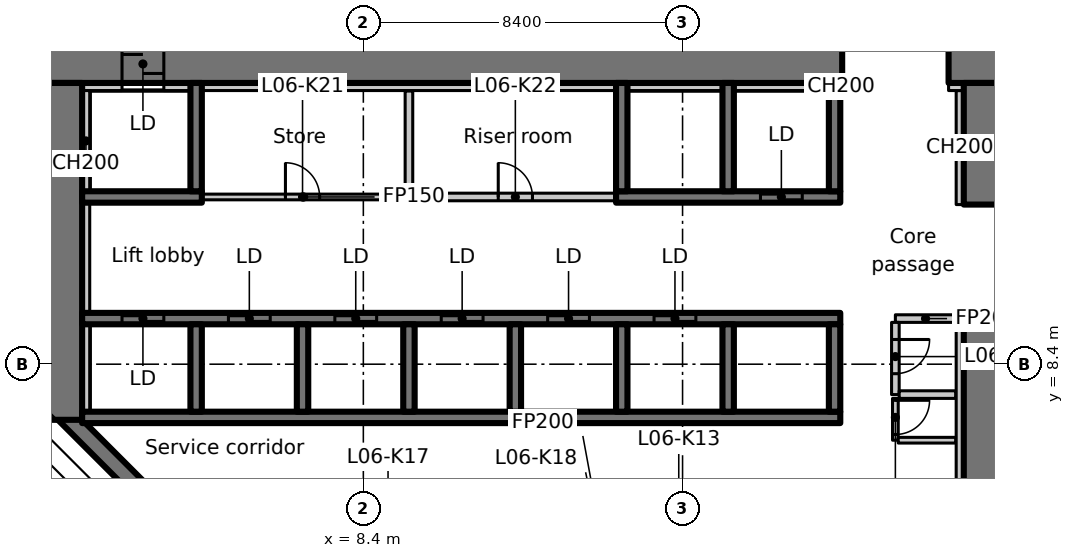
"""IFC4 building model, lengths in metres.
Left out: names, types, materials, properties, quantities, classifications, styles, units other than length and angle.
Written with IfcOpenShell. Run it as: python <this file> out.ifc"""

import sys

from ifc_helpers import new_model, si_unit, direction, frame, frame_2d, origin, place, context, subcontext, project, spatial, rectangle, extrude, element, fill, save


model = new_model("IFC4")
c1 = context("Model", 3, precision=1e-05, world=origin(), true_north=direction((0.0, 1.0)))
c2 = subcontext(c1, "Body", "Model", "MODEL_VIEW")
j1 = project(units=[si_unit("LENGTHUNIT", "METRE"), si_unit("PLANEANGLEUNIT", "RADIAN")], contexts=[c1])
p1 = place(None, origin())
s1 = spatial("IfcSite", under=j1, at=p1, CompositionType="ELEMENT")
p2 = place(p1, origin())
s2 = spatial("IfcBuilding", under=s1, at=p2, CompositionType="ELEMENT")
p3 = place(p2, frame((0.0, 0.0, 36.5)))
s3 = spatial("IfcBuildingStorey", under=s2, at=p3, CompositionType="ELEMENT", Elevation=36.5)
p4 = place(p3, frame((0.264, 4.816, 0.0), z_axis=(0.0, 0.0, 1.0), x_axis=(-0.707144708978, 0.707068851361, 0.0)))
e1 = element("IfcWall", 1, at=p4, inside=s3, PredefinedType="PARAPET", context=c2, shape_type="SweptSolid", body=[
    extrude(rectangle(XDim=3.219, YDim=0.25, at=frame_2d((1.609, 0.0))), origin(), (0.0, 0.0, 1.0), 1.1),
])
p5 = place(p3, frame((0.5, 7.118, 0.0), z_axis=(0.0, 0.0, 1.0), x_axis=(0.707106781187, -0.707106781187, 0.0)))
e2 = element("IfcWall", 2, at=p5, inside=s3, PredefinedType="SHEAR", context=c2, shape_type="SweptSolid", body=[
    extrude(rectangle(XDim=9.36, YDim=0.45, at=frame_2d((4.68, 0.0))), origin(), (0.0, 0.0, 1.0), 3.35),
])
p6 = place(p3, frame((-1.1, 16.3, 0.0), z_axis=(0.0, 0.0, 1.0), x_axis=(1.0, 0.0, 0.0)))
e3 = element("IfcWall", 3, at=p6, inside=s3, PredefinedType="SHEAR", context=c2, shape_type="SweptSolid", body=[
    extrude(rectangle(XDim=22.1, YDim=1.0, at=frame_2d((11.05, 0.0))), origin(), (0.0, 0.0, 1.0), 3.35),
])
p7 = place(p6, frame((3.15, 0.0, 0.0)))
e4 = element("IfcOpeningElement", 4, at=p7, cuts=e3, PredefinedType="OPENING", context=c2, shape_type="SweptSolid", body=[
    extrude(rectangle(XDim=1.1, YDim=2.3, at=frame_2d((0.55, 1.15))), frame((0.0, 0.51, 0.0), z_axis=(0.0, -1.0, 0.0), x_axis=(1.0, 0.0, 0.0)), (0.0, 0.0, 1.0), 1.02),
])
p8 = place(p3, frame((23.8, 16.3, 0.0), z_axis=(0.0, 0.0, 1.0), x_axis=(1.0, 0.0, 0.0)))
e5 = element("IfcWall", 5, at=p8, inside=s3, PredefinedType="SHEAR", context=c2, shape_type="SweptSolid", body=[
    extrude(rectangle(XDim=1.4, YDim=1.0, at=frame_2d((0.7, 0.0))), origin(), (0.0, 0.0, 1.0), 3.35),
])
p9 = place(p3, frame((0.5, 6.936, 0.0), z_axis=(0.0, 0.0, 1.0), x_axis=(0.0, 1.0, 0.0)))
e6 = element("IfcWall", 6, at=p9, inside=s3, PredefinedType="SHEAR", context=c2, shape_type="SweptSolid", body=[
    extrude(rectangle(XDim=8.864, YDim=1.0, at=frame_2d((4.432, 0.0))), origin(), (0.0, 0.0, 1.0), 3.35),
])
p10 = place(p3, frame((24.7, 1.0, 0.0), z_axis=(0.0, 0.0, 1.0), x_axis=(0.0, 1.0, 0.0)))
e7 = element("IfcWall", 7, at=p10, inside=s3, PredefinedType="SHEAR", context=c2, shape_type="SweptSolid", body=[
    extrude(rectangle(XDim=8.8, YDim=1.0, at=frame_2d((4.4, 0.0))), origin(), (0.0, 0.0, 1.0), 3.35),
])
p11 = place(p3, frame((24.7, 12.6, 0.0), z_axis=(0.0, 0.0, 1.0), x_axis=(0.0, 1.0, 0.0)))
e8 = element("IfcWall", 8, at=p11, inside=s3, PredefinedType="SHEAR", context=c2, shape_type="SweptSolid", body=[
    extrude(rectangle(XDim=3.2, YDim=1.0, at=frame_2d((1.6, 0.0))), origin(), (0.0, 0.0, 1.0), 3.35),
])
p12 = place(p3, frame((24.1, 12.6, 0.0), z_axis=(0.0, 0.0, 1.0), x_axis=(0.0, 1.0, 0.0)))
e9 = element("IfcWall", 9, at=p12, inside=s3, PredefinedType="PARTITIONING", context=c2, shape_type="SweptSolid", body=[
    extrude(rectangle(XDim=3.0, YDim=0.2, at=frame_2d((1.5, 0.0))), origin(), (0.0, 0.0, 1.0), 3.35),
])
p13 = place(p3, frame((1.0, 15.7, 0.0), z_axis=(0.0, 0.0, 1.0), x_axis=(1.0, 0.0, 0.0)))
e10 = element("IfcWall", 10, at=p13, inside=s3, PredefinedType="PARTITIONING", context=c2, shape_type="SweptSolid", body=[
    extrude(rectangle(XDim=1.05, YDim=0.2, at=frame_2d((0.525, 0.0))), origin(), (0.0, 0.0, 1.0), 3.35),
])
p14 = place(p3, frame((23.8, 15.7, 0.0), z_axis=(0.0, 0.0, 1.0), x_axis=(1.0, 0.0, 0.0)))
e11 = element("IfcWall", 11, at=p14, inside=s3, PredefinedType="PARTITIONING", context=c2, shape_type="SweptSolid", body=[
    extrude(rectangle(XDim=0.4, YDim=0.2, at=frame_2d((0.2, 0.0))), origin(), (0.0, 0.0, 1.0), 3.35),
])
p15 = place(p3, frame((1.0, 7.0, 0.0), z_axis=(0.0, 0.0, 1.0), x_axis=(1.0, 0.0, 0.0)))
e12 = element("IfcWall", 12, at=p15, inside=s3, PredefinedType="SHEAR", context=c2, shape_type="SweptSolid", body=[
    extrude(rectangle(XDim=19.95, YDim=0.3, at=frame_2d((9.975, 0.0))), origin(), (0.0, 0.0, 1.0), 3.35),
])
p16 = place(p3, frame((1.0, 9.6, 0.0), z_axis=(0.0, 0.0, 1.0), x_axis=(1.0, 0.0, 0.0)))
e13 = element("IfcWall", 13, at=p16, inside=s3, PredefinedType="SHEAR", context=c2, shape_type="SweptSolid", body=[
    extrude(rectangle(XDim=19.95, YDim=0.3, at=frame_2d((9.975, 0.0))), origin(), (0.0, 0.0, 1.0), 3.35),
])
p17 = place(p16, frame((1.05, 0.0, 0.0)))
e14 = element("IfcOpeningElement", 14, at=p17, cuts=e13, PredefinedType="OPENING", context=c2, shape_type="SweptSolid", body=[
    extrude(rectangle(XDim=1.1, YDim=2.3, at=frame_2d((0.55, 1.15))), frame((0.0, 0.16, 0.0), z_axis=(0.0, -1.0, 0.0), x_axis=(1.0, 0.0, 0.0)), (0.0, 0.0, 1.0), 0.32),
])
p18 = place(p16, frame((3.85, 0.0, 0.0)))
e15 = element("IfcOpeningElement", 15, at=p18, cuts=e13, PredefinedType="OPENING", context=c2, shape_type="SweptSolid", body=[
    extrude(rectangle(XDim=1.1, YDim=2.3, at=frame_2d((0.55, 1.15))), frame((0.0, 0.16, 0.0), z_axis=(0.0, -1.0, 0.0), x_axis=(1.0, 0.0, 0.0)), (0.0, 0.0, 1.0), 0.32),
])
p19 = place(p16, frame((6.65, 0.0, 0.0)))
e16 = element("IfcOpeningElement", 16, at=p19, cuts=e13, PredefinedType="OPENING", context=c2, shape_type="SweptSolid", body=[
    extrude(rectangle(XDim=1.1, YDim=2.3, at=frame_2d((0.55, 1.15))), frame((0.0, 0.16, 0.0), z_axis=(0.0, -1.0, 0.0), x_axis=(1.0, 0.0, 0.0)), (0.0, 0.0, 1.0), 0.32),
])
p20 = place(p16, frame((9.45, 0.0, 0.0)))
e17 = element("IfcOpeningElement", 17, at=p20, cuts=e13, PredefinedType="OPENING", context=c2, shape_type="SweptSolid", body=[
    extrude(rectangle(XDim=1.1, YDim=2.3, at=frame_2d((0.55, 1.15))), frame((0.0, 0.16, 0.0), z_axis=(0.0, -1.0, 0.0), x_axis=(1.0, 0.0, 0.0)), (0.0, 0.0, 1.0), 0.32),
])
p21 = place(p16, frame((12.25, 0.0, 0.0)))
e18 = element("IfcOpeningElement", 18, at=p21, cuts=e13, PredefinedType="OPENING", context=c2, shape_type="SweptSolid", body=[
    extrude(rectangle(XDim=1.1, YDim=2.3, at=frame_2d((0.55, 1.15))), frame((0.0, 0.16, 0.0), z_axis=(0.0, -1.0, 0.0), x_axis=(1.0, 0.0, 0.0)), (0.0, 0.0, 1.0), 0.32),
])
p22 = place(p16, frame((15.05, 0.0, 0.0)))
e19 = element("IfcOpeningElement", 19, at=p22, cuts=e13, PredefinedType="OPENING", context=c2, shape_type="SweptSolid", body=[
    extrude(rectangle(XDim=1.1, YDim=2.3, at=frame_2d((0.55, 1.15))), frame((0.0, 0.16, 0.0), z_axis=(0.0, -1.0, 0.0), x_axis=(1.0, 0.0, 0.0)), (0.0, 0.0, 1.0), 0.32),
])
for number, where, z_axis, x_axis in (
    (20, (4.0, 7.15, 0.0), (0.0, 0.0, 1.0), (0.0, 1.0, 0.0)),
    (21, (6.8, 7.15, 0.0), (0.0, 0.0, 1.0), (0.0, 1.0, 0.0)),
    (22, (9.6, 7.15, 0.0), (0.0, 0.0, 1.0), (0.0, 1.0, 0.0)),
    (23, (12.4, 7.15, 0.0), (0.0, 0.0, 1.0), (0.0, 1.0, 0.0)),
    (24, (15.2, 7.15, 0.0), (0.0, 0.0, 1.0), (0.0, 1.0, 0.0)),
    (25, (18.0, 7.15, 0.0), (0.0, 0.0, 1.0), (0.0, 1.0, 0.0)),
    (26, (20.8, 7.15, 0.0), (0.0, 0.0, 1.0), (0.0, 1.0, 0.0)),
):
    element("IfcWall", number, at=place(p3, frame(where, z_axis=z_axis, x_axis=x_axis)), inside=s3, PredefinedType="SHEAR", context=c2, shape_type="SweptSolid", body=[
        extrude(rectangle(XDim=2.3, YDim=0.3, at=frame_2d((1.15, 0.0))), origin(), (0.0, 0.0, 1.0), 3.35),
    ])
p23 = place(p3, frame((1.0, 12.8, 0.0), z_axis=(0.0, 0.0, 1.0), x_axis=(1.0, 0.0, 0.0)))
e27 = element("IfcWall", 27, at=p23, inside=s3, PredefinedType="SHEAR", context=c2, shape_type="SweptSolid", body=[
    extrude(rectangle(XDim=3.15, YDim=0.3, at=frame_2d((1.575, 0.0))), origin(), (0.0, 0.0, 1.0), 3.35),
])
p24 = place(p3, frame((4.0, 12.95, 0.0), z_axis=(0.0, 0.0, 1.0), x_axis=(0.0, 1.0, 0.0)))
e28 = element("IfcWall", 28, at=p24, inside=s3, PredefinedType="SHEAR", context=c2, shape_type="SweptSolid", body=[
    extrude(rectangle(XDim=2.85, YDim=0.3, at=frame_2d((1.425, 0.0))), origin(), (0.0, 0.0, 1.0), 3.35),
])
p25 = place(p3, frame((15.05, 12.8, 0.0), z_axis=(0.0, 0.0, 1.0), x_axis=(1.0, 0.0, 0.0)))
e29 = element("IfcWall", 29, at=p25, inside=s3, PredefinedType="SHEAR", context=c2, shape_type="SweptSolid", body=[
    extrude(rectangle(XDim=5.9, YDim=0.3, at=frame_2d((2.95, 0.0))), origin(), (0.0, 0.0, 1.0), 3.35),
])
p26 = place(p25, frame((3.8, 0.0, 0.0)))
e30 = element("IfcOpeningElement", 30, at=p26, cuts=e29, PredefinedType="OPENING", context=c2, shape_type="SweptSolid", body=[
    extrude(rectangle(XDim=1.1, YDim=2.3, at=frame_2d((0.55, 1.15))), frame((0.0, 0.16, 0.0), z_axis=(0.0, -1.0, 0.0), x_axis=(1.0, 0.0, 0.0)), (0.0, 0.0, 1.0), 0.32),
])
for number, where, z_axis, x_axis in (
    (31, (15.2, 12.95, 0.0), (0.0, 0.0, 1.0), (0.0, 1.0, 0.0)),
    (32, (18.0, 12.95, 0.0), (0.0, 0.0, 1.0), (0.0, 1.0, 0.0)),
    (33, (20.8, 12.95, 0.0), (0.0, 0.0, 1.0), (0.0, 1.0, 0.0)),
):
    element("IfcWall", number, at=place(p3, frame(where, z_axis=z_axis, x_axis=x_axis)), inside=s3, PredefinedType="SHEAR", context=c2, shape_type="SweptSolid", body=[
        extrude(rectangle(XDim=2.85, YDim=0.3, at=frame_2d((1.425, 0.0))), origin(), (0.0, 0.0, 1.0), 3.35),
    ])
p27 = place(p3, frame((9.6, 15.588, 0.0), z_axis=(0.0, 0.0, 1.0), x_axis=(0.0, -1.0, 0.0)))
e34 = element("IfcWall", 34, at=p27, inside=s3, PredefinedType="PARTITIONING", context=c2, shape_type="SweptSolid", body=[
    extrude(rectangle(XDim=2.788, YDim=0.2, at=frame_2d((1.394, 0.0))), origin(), (0.0, 0.0, 1.0), 3.35),
])
p28 = place(p3, frame((9.7, 12.8, 0.0), z_axis=(0.0, 0.0, 1.0), x_axis=(1.0, 0.0, 0.0)))
e35 = element("IfcWall", 35, at=p28, inside=s3, PredefinedType="PARTITIONING", context=c2, shape_type="SweptSolid", body=[
    extrude(rectangle(XDim=5.338, YDim=0.2, at=frame_2d((2.669, 0.0))), origin(), (0.0, 0.0, 1.0), 3.35),
])
p29 = place(p28, frame((2.25, 0.0, 0.0)))
e36 = element("IfcOpeningElement", 36, at=p29, cuts=e35, PredefinedType="OPENING", context=c2, shape_type="SweptSolid", body=[
    extrude(rectangle(XDim=0.9, YDim=2.1, at=frame_2d((0.45, 1.05))), frame((0.0, 0.11, 0.0), z_axis=(0.0, -1.0, 0.0), x_axis=(1.0, 0.0, 0.0)), (0.0, 0.0, 1.0), 0.22),
])
p30 = place(p3, frame((23.988, 9.6, 0.0), z_axis=(0.0, 0.0, 1.0), x_axis=(-1.0, 0.0, 0.0)))
e37 = element("IfcWall", 37, at=p30, inside=s3, PredefinedType="PARTITIONING", context=c2, shape_type="SweptSolid", body=[
    extrude(rectangle(XDim=1.588, YDim=0.2, at=frame_2d((0.794, 0.0))), origin(), (0.0, 0.0, 1.0), 3.35),
])
p31 = place(p3, frame((22.4, 9.5, 0.0), z_axis=(0.0, 0.0, 1.0), x_axis=(0.0, -1.0, 0.0)))
e38 = element("IfcWall", 38, at=p31, inside=s3, PredefinedType="PARTITIONING", context=c2, shape_type="SweptSolid", body=[
    extrude(rectangle(XDim=1.9, YDim=0.2, at=frame_2d((0.95, 0.0))), origin(), (0.0, 0.0, 1.0), 3.35),
])
p32 = place(p31, frame((0.45, 0.0, 0.0)))
e39 = element("IfcOpeningElement", 39, at=p32, cuts=e38, PredefinedType="OPENING", context=c2, shape_type="SweptSolid", body=[
    extrude(rectangle(XDim=0.9, YDim=2.1, at=frame_2d((0.45, 1.05))), frame((0.0, 0.11, 0.0), z_axis=(0.0, -1.0, 0.0), x_axis=(1.0, 0.0, 0.0)), (0.0, 0.0, 1.0), 0.22),
])
p33 = place(p3, frame((22.5, 7.6, 0.0), z_axis=(0.0, 0.0, 1.0), x_axis=(1.0, 0.0, 0.0)))
e40 = element("IfcWall", 40, at=p33, inside=s3, PredefinedType="PARTITIONING", context=c2, shape_type="SweptSolid", body=[
    extrude(rectangle(XDim=1.488, YDim=0.2, at=frame_2d((0.744, 0.0))), origin(), (0.0, 0.0, 1.0), 3.35),
])
p34 = place(p3, frame((4.162, 12.8, 0.0), z_axis=(0.0, 0.0, 1.0), x_axis=(1.0, 0.0, 0.0)))
e41 = element("IfcWall", 41, at=p34, inside=s3, PredefinedType="PARTITIONING", context=c2, shape_type="SweptSolid", body=[
    extrude(rectangle(XDim=5.338, YDim=0.15, at=frame_2d((2.669, 0.0))), origin(), (0.0, 0.0, 1.0), 3.35),
])
p35 = place(p34, frame((2.188, 0.0, 0.0)))
e42 = element("IfcOpeningElement", 42, at=p35, cuts=e41, PredefinedType="OPENING", context=c2, shape_type="SweptSolid", body=[
    extrude(rectangle(XDim=0.9, YDim=2.1, at=frame_2d((0.45, 1.05))), frame((0.0, 0.085, 0.0), z_axis=(0.0, -1.0, 0.0), x_axis=(1.0, 0.0, 0.0)), (0.0, 0.0, 1.0), 0.17),
])
p36 = place(p3, frame((22.4, 7.5, 0.0), z_axis=(0.0, 0.0, 1.0), x_axis=(0.0, -1.0, 0.0)))
e43 = element("IfcWall", 43, at=p36, inside=s3, PredefinedType="PARTITIONING", context=c2, shape_type="SweptSolid", body=[
    extrude(rectangle(XDim=1.1, YDim=0.15, at=frame_2d((0.55, 0.0))), origin(), (0.0, 0.0, 1.0), 3.35),
])
p37 = place(p36, frame((0.05, 0.0, 0.0)))
e44 = element("IfcOpeningElement", 44, at=p37, cuts=e43, PredefinedType="OPENING", context=c2, shape_type="SweptSolid", body=[
    extrude(rectangle(XDim=0.9, YDim=2.1, at=frame_2d((0.45, 1.05))), frame((0.0, 0.085, 0.0), z_axis=(0.0, -1.0, 0.0), x_axis=(1.0, 0.0, 0.0)), (0.0, 0.0, 1.0), 0.17),
])
p38 = place(p3, frame((22.475, 6.4, 0.0), z_axis=(0.0, 0.0, 1.0), x_axis=(1.0, 0.0, 0.0)))
e45 = element("IfcWall", 45, at=p38, inside=s3, PredefinedType="PARTITIONING", context=c2, shape_type="SweptSolid", body=[
    extrude(rectangle(XDim=1.513, YDim=0.15, at=frame_2d((0.756, 0.0))), origin(), (0.0, 0.0, 1.0), 3.35),
])
p39 = place(p3, frame((1.1, 7.15, 0.0), z_axis=(0.0, 0.0, 1.0), x_axis=(0.0, 1.0, 0.0)))
e46 = element("IfcWall", 46, at=p39, inside=s3, PredefinedType="PARTITIONING", context=c2, shape_type="SweptSolid", body=[
    extrude(rectangle(XDim=2.3, YDim=0.2, at=frame_2d((1.15, 0.0))), origin(), (0.0, 0.0, 1.0), 3.35),
])
p40 = place(p3, frame((1.1, 9.75, 0.0), z_axis=(0.0, 0.0, 1.0), x_axis=(0.0, 1.0, 0.0)))
e47 = element("IfcWall", 47, at=p40, inside=s3, PredefinedType="PARTITIONING", context=c2, shape_type="SweptSolid", body=[
    extrude(rectangle(XDim=2.9, YDim=0.2, at=frame_2d((1.45, 0.0))), origin(), (0.0, 0.0, 1.0), 3.35),
])
p41 = place(p3, frame((1.1, 12.95, 0.0), z_axis=(0.0, 0.0, 1.0), x_axis=(0.0, 1.0, 0.0)))
e48 = element("IfcWall", 48, at=p41, inside=s3, PredefinedType="PARTITIONING", context=c2, shape_type="SweptSolid", body=[
    extrude(rectangle(XDim=2.65, YDim=0.2, at=frame_2d((1.325, 0.0))), origin(), (0.0, 0.0, 1.0), 3.35),
])
p42 = place(p3, frame((3.15, 15.7, 0.0), z_axis=(0.0, 0.0, 1.0), x_axis=(1.0, 0.0, 0.0)))
e49 = element("IfcWall", 49, at=p42, inside=s3, PredefinedType="PARTITIONING", context=c2, shape_type="SweptSolid", body=[
    extrude(rectangle(XDim=0.7, YDim=0.2, at=frame_2d((0.35, 0.0))), origin(), (0.0, 0.0, 1.0), 3.35),
])
p43 = place(p3, frame((4.15, 15.7, 0.0), z_axis=(0.0, 0.0, 1.0), x_axis=(1.0, 0.0, 0.0)))
e50 = element("IfcWall", 50, at=p43, inside=s3, PredefinedType="PARTITIONING", context=c2, shape_type="SweptSolid", body=[
    extrude(rectangle(XDim=10.9, YDim=0.2, at=frame_2d((5.45, 0.0))), origin(), (0.0, 0.0, 1.0), 3.35),
])
for number, where, z_axis, x_axis in (
    (51, (15.35, 15.7, 0.0), (0.0, 0.0, 1.0), (1.0, 0.0, 0.0)),
    (52, (18.15, 15.7, 0.0), (0.0, 0.0, 1.0), (1.0, 0.0, 0.0)),
):
    element("IfcWall", number, at=place(p3, frame(where, z_axis=z_axis, x_axis=x_axis)), inside=s3, PredefinedType="PARTITIONING", context=c2, shape_type="SweptSolid", body=[
        extrude(rectangle(XDim=2.5, YDim=0.2, at=frame_2d((1.25, 0.0))), origin(), (0.0, 0.0, 1.0), 3.35),
    ])
p44 = place(p3, frame((20.95, 15.7, 0.0), z_axis=(0.0, 0.0, 1.0), x_axis=(1.0, 0.0, 0.0)))
e53 = element("IfcWall", 53, at=p44, inside=s3, PredefinedType="PARTITIONING", context=c2, shape_type="SweptSolid", body=[
    extrude(rectangle(XDim=0.05, YDim=0.2, at=frame_2d((0.025, 0.0))), origin(), (0.0, 0.0, 1.0), 3.35),
])
p45 = place(p3, frame((24.1, 4.35, 0.0), z_axis=(0.0, 0.0, 1.0), x_axis=(0.0, 1.0, 0.0)))
e54 = element("IfcWall", 54, at=p45, inside=s3, PredefinedType="PARTITIONING", context=c2, shape_type="SweptSolid", body=[
    extrude(rectangle(XDim=5.45, YDim=0.2, at=frame_2d((2.725, 0.0))), origin(), (0.0, 0.0, 1.0), 3.35),
])
p46 = place(p17, origin())
e55 = element("IfcDoor", 55, at=p46, inside=s3, OperationType="SLIDING_TO_LEFT", PredefinedType="DOOR", context=c2, shape_type="SweptSolid", body=[
    extrude(rectangle(XDim=1.1, YDim=2.3, at=frame_2d((0.55, 1.15))), frame((0.0, 0.025, 0.0), z_axis=(0.0, -1.0, 0.0), x_axis=(1.0, 0.0, 0.0)), (0.0, 0.0, 1.0), 0.05),
])
fill(e14, e55)
p47 = place(p18, origin())
e56 = element("IfcDoor", 56, at=p47, inside=s3, OperationType="SLIDING_TO_LEFT", PredefinedType="DOOR", context=c2, shape_type="SweptSolid", body=[
    extrude(rectangle(XDim=1.1, YDim=2.3, at=frame_2d((0.55, 1.15))), frame((0.0, 0.025, 0.0), z_axis=(0.0, -1.0, 0.0), x_axis=(1.0, 0.0, 0.0)), (0.0, 0.0, 1.0), 0.05),
])
fill(e15, e56)
p48 = place(p19, origin())
e57 = element("IfcDoor", 57, at=p48, inside=s3, OperationType="SLIDING_TO_LEFT", PredefinedType="DOOR", context=c2, shape_type="SweptSolid", body=[
    extrude(rectangle(XDim=1.1, YDim=2.3, at=frame_2d((0.55, 1.15))), frame((0.0, 0.025, 0.0), z_axis=(0.0, -1.0, 0.0), x_axis=(1.0, 0.0, 0.0)), (0.0, 0.0, 1.0), 0.05),
])
fill(e16, e57)
p49 = place(p20, origin())
e58 = element("IfcDoor", 58, at=p49, inside=s3, OperationType="SLIDING_TO_LEFT", PredefinedType="DOOR", context=c2, shape_type="SweptSolid", body=[
    extrude(rectangle(XDim=1.1, YDim=2.3, at=frame_2d((0.55, 1.15))), frame((0.0, 0.025, 0.0), z_axis=(0.0, -1.0, 0.0), x_axis=(1.0, 0.0, 0.0)), (0.0, 0.0, 1.0), 0.05),
])
fill(e17, e58)
p50 = place(p21, origin())
e59 = element("IfcDoor", 59, at=p50, inside=s3, OperationType="SLIDING_TO_LEFT", PredefinedType="DOOR", context=c2, shape_type="SweptSolid", body=[
    extrude(rectangle(XDim=1.1, YDim=2.3, at=frame_2d((0.55, 1.15))), frame((0.0, 0.025, 0.0), z_axis=(0.0, -1.0, 0.0), x_axis=(1.0, 0.0, 0.0)), (0.0, 0.0, 1.0), 0.05),
])
fill(e18, e59)
p51 = place(p22, origin())
e60 = element("IfcDoor", 60, at=p51, inside=s3, OperationType="SLIDING_TO_LEFT", PredefinedType="DOOR", context=c2, shape_type="SweptSolid", body=[
    extrude(rectangle(XDim=1.1, YDim=2.3, at=frame_2d((0.55, 1.15))), frame((0.0, 0.025, 0.0), z_axis=(0.0, -1.0, 0.0), x_axis=(1.0, 0.0, 0.0)), (0.0, 0.0, 1.0), 0.05),
])
fill(e19, e60)
p52 = place(p7, origin())
e61 = element("IfcDoor", 61, at=p52, inside=s3, OperationType="SLIDING_TO_LEFT", PredefinedType="DOOR", context=c2, shape_type="SweptSolid", body=[
    extrude(rectangle(XDim=1.1, YDim=2.3, at=frame_2d((0.55, 1.15))), frame((0.0, 0.025, 0.0), z_axis=(0.0, -1.0, 0.0), x_axis=(1.0, 0.0, 0.0)), (0.0, 0.0, 1.0), 0.05),
])
fill(e4, e61)
p53 = place(p26, origin())
e62 = element("IfcDoor", 62, at=p53, inside=s3, OperationType="SLIDING_TO_LEFT", PredefinedType="DOOR", context=c2, shape_type="SweptSolid", body=[
    extrude(rectangle(XDim=1.1, YDim=2.3, at=frame_2d((0.55, 1.15))), frame((0.0, 0.025, 0.0), z_axis=(0.0, -1.0, 0.0), x_axis=(1.0, 0.0, 0.0)), (0.0, 0.0, 1.0), 0.05),
])
fill(e30, e62)
p54 = place(p37, origin())
e63 = element("IfcDoor", 63, at=p54, inside=s3, OperationType="SINGLE_SWING_LEFT", PredefinedType="DOOR", context=c2, shape_type="SweptSolid", body=[
    extrude(rectangle(XDim=0.9, YDim=2.1, at=frame_2d((0.45, 1.05))), frame((0.0, 0.025, 0.0), z_axis=(0.0, -1.0, 0.0), x_axis=(1.0, 0.0, 0.0)), (0.0, 0.0, 1.0), 0.05),
])
fill(e44, e63)
p55 = place(p32, origin())
e64 = element("IfcDoor", 64, at=p55, inside=s3, OperationType="SINGLE_SWING_RIGHT", PredefinedType="DOOR", context=c2, shape_type="SweptSolid", body=[
    extrude(rectangle(XDim=0.9, YDim=2.1, at=frame_2d((0.45, 1.05))), frame((0.0, 0.025, 0.0), z_axis=(0.0, -1.0, 0.0), x_axis=(1.0, 0.0, 0.0)), (0.0, 0.0, 1.0), 0.05),
])
fill(e39, e64)
p56 = place(p35, origin())
e65 = element("IfcDoor", 65, at=p56, inside=s3, OperationType="SINGLE_SWING_LEFT", PredefinedType="DOOR", context=c2, shape_type="SweptSolid", body=[
    extrude(rectangle(XDim=0.9, YDim=2.1, at=frame_2d((0.45, 1.05))), frame((0.0, 0.025, 0.0), z_axis=(0.0, -1.0, 0.0), x_axis=(1.0, 0.0, 0.0)), (0.0, 0.0, 1.0), 0.05),
])
fill(e42, e65)
p57 = place(p29, origin())
e66 = element("IfcDoor", 66, at=p57, inside=s3, OperationType="SINGLE_SWING_RIGHT", PredefinedType="DOOR", context=c2, shape_type="SweptSolid", body=[
    extrude(rectangle(XDim=0.9, YDim=2.1, at=frame_2d((0.45, 1.05))), frame((0.0, 0.025, 0.0), z_axis=(0.0, -1.0, 0.0), x_axis=(1.0, 0.0, 0.0)), (0.0, 0.0, 1.0), 0.05),
])
fill(e36, e66)
save(model, sys.argv[1])
